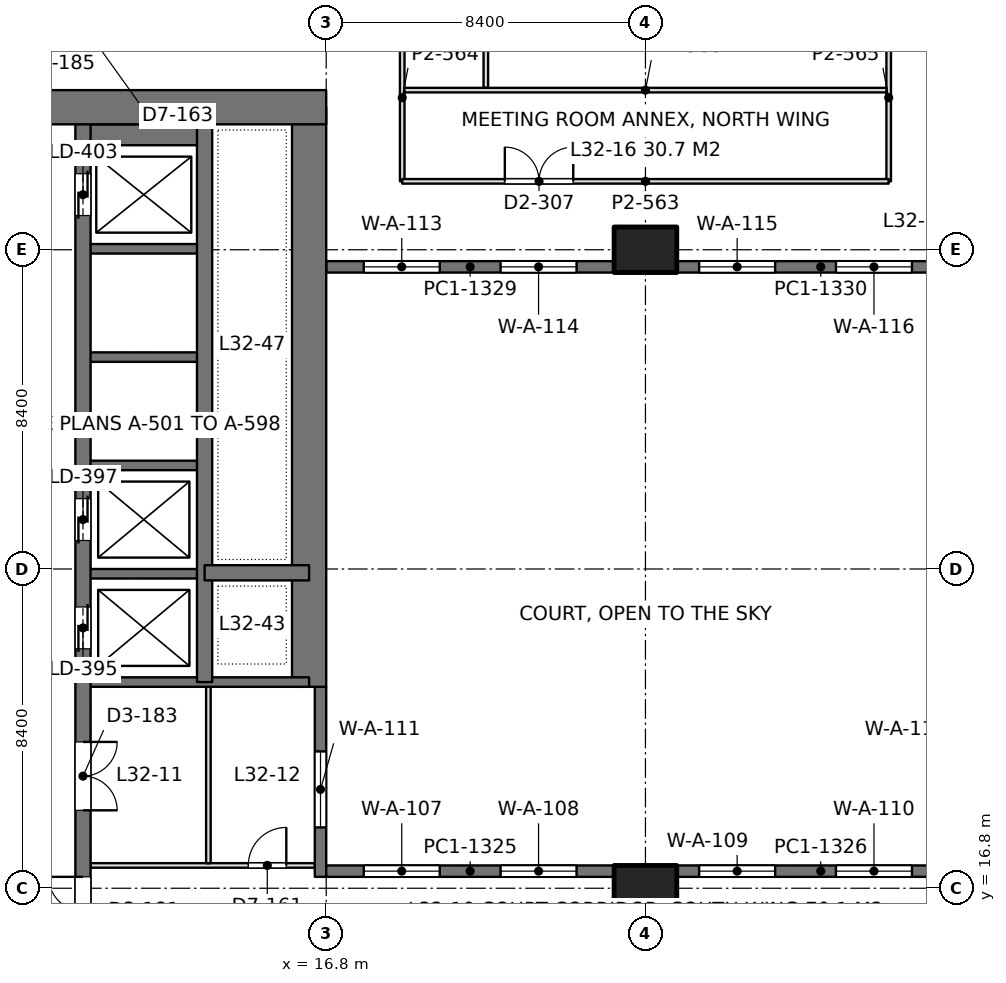
"""IFC4 building model, lengths in metres.
Left out: names, types, materials, properties, quantities, classifications, styles, units other than length and angle.
Written with IfcOpenShell. Run it as: python <this file> out.ifc"""

import sys

from ifc_helpers import new_model, si_unit, direction, frame, frame_2d, origin, origin_2d, place, context, subcontext, project, spatial, rectangle, extrude, element, fill, save


model = new_model("IFC4")
c1 = context("Model", 3, precision=1e-05, world=origin(), true_north=direction((0.0, 1.0)))
c2 = subcontext(c1, "Body", "Model", "MODEL_VIEW")
j1 = project(units=[si_unit("LENGTHUNIT", "METRE"), si_unit("PLANEANGLEUNIT", "RADIAN")], contexts=[c1])
p1 = place(None, origin())
s1 = spatial("IfcSite", under=j1, at=p1, CompositionType="ELEMENT")
p2 = place(p1, origin())
s2 = spatial("IfcBuilding", under=s1, at=p2, CompositionType="ELEMENT")
p3 = place(p2, frame((0.0, 0.0, 142.8)))
s3 = spatial("IfcBuildingStorey", under=s2, at=p3, CompositionType="ELEMENT", Elevation=142.8)
for number, where, z_axis, x_axis in (
    (1, (25.2, 16.8, 0.0), (0.0, 0.0, 1.0), (1.0, 0.0, 0.0)),
    (2, (25.2, 33.6, 0.0), (0.0, 0.0, 1.0), (1.0, 0.0, 0.0)),
):
    element("IfcColumn", number, at=place(p3, frame(where, z_axis=z_axis, x_axis=x_axis)), inside=s3, PredefinedType="COLUMN", context=c2, shape_type="SweptSolid", body=[
        extrude(rectangle(XDim=1.65, YDim=1.2, at=origin_2d()), origin(), (0.0, 0.0, 1.0), 4.2),
    ])
p4 = place(p3, frame((-1.2, 37.35, 0.0), z_axis=(0.0, 0.0, 1.0), x_axis=(1.0, 0.0, 0.0)))
e3 = element("IfcWall", 3, at=p4, inside=s3, PredefinedType="SHEAR", context=c2, shape_type="SweptSolid", body=[
    extrude(rectangle(XDim=18.0, YDim=0.9, at=frame_2d((9.0, 0.0))), origin(), (0.0, 0.0, 1.0), 4.2),
])
p5 = place(p4, frame((8.95, 0.0, 0.0)))
e4 = element("IfcOpeningElement", 4, at=p5, cuts=e3, PredefinedType="OPENING", context=c2, shape_type="SweptSolid", body=[
    extrude(rectangle(XDim=1.8, YDim=2.4, at=frame_2d((0.9, 1.2))), frame((0.0, 0.46, 0.0), z_axis=(0.0, -1.0, 0.0), x_axis=(1.0, 0.0, 0.0)), (0.0, 0.0, 1.0), 0.92),
])
p6 = place(p3, frame((16.35, 22.1, 0.0), z_axis=(0.0, 0.0, 1.0), x_axis=(0.0, 1.0, 0.0)))
e5 = element("IfcWall", 5, at=p6, inside=s3, PredefinedType="SHEAR", context=c2, shape_type="SweptSolid", body=[
    extrude(rectangle(XDim=15.25, YDim=0.9, at=frame_2d((7.625, 0.0))), origin(), (0.0, 0.0, 1.0), 4.2),
])
p7 = place(p3, frame((10.4, 13.05, 0.0), z_axis=(0.0, 0.0, 1.0), x_axis=(0.0, 1.0, 0.0)))
e6 = element("IfcWall", 6, at=p7, inside=s3, PredefinedType="SHEAR", context=c2, shape_type="SweptSolid", body=[
    extrude(rectangle(XDim=24.3, YDim=0.4, at=frame_2d((12.15, 0.0))), origin(), (0.0, 0.0, 1.0), 4.2),
])
p8 = place(p7, frame((10.05, 0.0, 0.0)))
e7 = element("IfcOpeningElement", 7, at=p8, cuts=e6, PredefinedType="OPENING", context=c2, shape_type="SweptSolid", body=[
    extrude(rectangle(XDim=1.1, YDim=2.2, at=frame_2d((0.55, 1.1))), frame((0.0, 0.21, 0.0), z_axis=(0.0, -1.0, 0.0), x_axis=(1.0, 0.0, 0.0)), (0.0, 0.0, 1.0), 0.42),
])
p9 = place(p7, frame((12.9, 0.0, 0.0)))
e8 = element("IfcOpeningElement", 8, at=p9, cuts=e6, PredefinedType="OPENING", context=c2, shape_type="SweptSolid", body=[
    extrude(rectangle(XDim=1.1, YDim=2.2, at=frame_2d((0.55, 1.1))), frame((0.0, 0.21, 0.0), z_axis=(0.0, -1.0, 0.0), x_axis=(1.0, 0.0, 0.0)), (0.0, 0.0, 1.0), 0.42),
])
p10 = place(p7, frame((21.45, 0.0, 0.0)))
e9 = element("IfcOpeningElement", 9, at=p10, cuts=e6, PredefinedType="OPENING", context=c2, shape_type="SweptSolid", body=[
    extrude(rectangle(XDim=1.1, YDim=2.2, at=frame_2d((0.55, 1.1))), frame((0.0, 0.21, 0.0), z_axis=(0.0, -1.0, 0.0), x_axis=(1.0, 0.0, 0.0)), (0.0, 0.0, 1.0), 0.42),
])
p11 = place(p7, frame((2.25, 0.0, 0.0)))
e10 = element("IfcOpeningElement", 10, at=p11, cuts=e6, PredefinedType="OPENING", context=c2, shape_type="SweptSolid", body=[
    extrude(rectangle(XDim=1.8, YDim=2.4, at=frame_2d((0.9, 1.2))), frame((0.0, 0.21, 0.0), z_axis=(0.0, -1.0, 0.0), x_axis=(1.0, 0.0, 0.0)), (0.0, 0.0, 1.0), 0.42),
])
p12 = place(p7, frame((5.8, 0.0, 0.0)))
e11 = element("IfcOpeningElement", 11, at=p12, cuts=e6, PredefinedType="OPENING", context=c2, shape_type="SweptSolid", body=[
    extrude(rectangle(XDim=1.8, YDim=2.4, at=frame_2d((0.9, 1.2))), frame((0.0, 0.21, 0.0), z_axis=(0.0, -1.0, 0.0), x_axis=(1.0, 0.0, 0.0)), (0.0, 0.0, 1.0), 0.42),
])
p13 = place(p3, frame((13.6, 22.225, 0.0), z_axis=(0.0, 0.0, 1.0), x_axis=(0.0, 1.0, 0.0)))
e12 = element("IfcWall", 12, at=p13, inside=s3, PredefinedType="SHEAR", context=c2, shape_type="SweptSolid", body=[
    extrude(rectangle(XDim=15.125, YDim=0.4, at=frame_2d((7.562, 0.0))), origin(), (0.0, 0.0, 1.0), 4.2),
])
p14 = place(p3, frame((13.6, 25.1, 0.0), z_axis=(0.0, 0.0, 1.0), x_axis=(1.0, 0.0, 0.0)))
e13 = element("IfcWall", 13, at=p14, inside=s3, PredefinedType="SHEAR", context=c2, shape_type="SweptSolid", body=[
    extrude(rectangle(XDim=2.75, YDim=0.4, at=frame_2d((1.375, 0.0))), origin(), (0.0, 0.0, 1.0), 4.2),
])
p15 = place(p3, frame((10.4, 22.225, 0.0), z_axis=(0.0, 0.0, 1.0), x_axis=(1.0, 0.0, 0.0)))
e14 = element("IfcWall", 14, at=p15, inside=s3, PredefinedType="SHEAR", context=c2, shape_type="SweptSolid", body=[
    extrude(rectangle(XDim=5.95, YDim=0.25, at=frame_2d((2.975, 0.0))), origin(), (0.0, 0.0, 1.0), 4.2),
])
for number, where, z_axis, x_axis in (
    (15, (10.4, 25.075, 0.0), (0.0, 0.0, 1.0), (1.0, 0.0, 0.0)),
    (16, (10.4, 27.925, 0.0), (0.0, 0.0, 1.0), (1.0, 0.0, 0.0)),
    (17, (10.4, 30.775, 0.0), (0.0, 0.0, 1.0), (1.0, 0.0, 0.0)),
    (18, (10.4, 33.625, 0.0), (0.0, 0.0, 1.0), (1.0, 0.0, 0.0)),
):
    element("IfcWall", number, at=place(p3, frame(where, z_axis=z_axis, x_axis=x_axis)), inside=s3, PredefinedType="SHEAR", context=c2, shape_type="SweptSolid", body=[
        extrude(rectangle(XDim=3.2, YDim=0.25, at=frame_2d((1.6, 0.0))), origin(), (0.0, 0.0, 1.0), 4.2),
    ])
p16 = place(p3, frame((10.4, 36.625, 0.0), z_axis=(0.0, 0.0, 1.0), x_axis=(1.0, 0.0, 0.0)))
e19 = element("IfcWall", 19, at=p16, inside=s3, PredefinedType="SHEAR", context=c2, shape_type="SweptSolid", body=[
    extrude(rectangle(XDim=3.2, YDim=0.55, at=frame_2d((1.6, 0.0))), origin(), (0.0, 0.0, 1.0), 4.2),
])
p17 = place(p3, frame((16.65, 17.1, 0.0), z_axis=(0.0, 0.0, 1.0), x_axis=(0.0, 1.0, 0.0)))
e20 = element("IfcWall", 20, at=p17, inside=s3, PredefinedType="SOLIDWALL", context=c2, shape_type="SweptSolid", body=[
    extrude(rectangle(XDim=5.0, YDim=0.3, at=frame_2d((2.5, 0.0))), origin(), (0.0, 0.0, 1.0), 4.05),
])
p18 = place(p17, frame((1.3, 0.0, 0.1)))
e21 = element("IfcOpeningElement", 21, at=p18, cuts=e20, PredefinedType="OPENING", context=c2, shape_type="SweptSolid", body=[
    extrude(rectangle(XDim=2.0, YDim=3.0, at=frame_2d((1.0, 1.5))), frame((0.0, 0.16, 0.0), z_axis=(0.0, -1.0, 0.0), x_axis=(1.0, 0.0, 0.0)), (0.0, 0.0, 1.0), 0.32),
])
p19 = place(p3, frame((16.8, 17.25, 0.0), z_axis=(0.0, 0.0, 1.0), x_axis=(1.0, 0.0, 0.0)))
e22 = element("IfcWall", 22, at=p19, inside=s3, PredefinedType="SOLIDWALL", context=c2, shape_type="SweptSolid", body=[
    extrude(rectangle(XDim=7.575, YDim=0.3, at=frame_2d((3.788, 0.0))), origin(), (0.0, 0.0, 1.0), 4.05),
])
p20 = place(p19, frame((0.988, 0.0, 0.1)))
e23 = element("IfcOpeningElement", 23, at=p20, cuts=e22, PredefinedType="OPENING", context=c2, shape_type="SweptSolid", body=[
    extrude(rectangle(XDim=2.0, YDim=3.0, at=frame_2d((1.0, 1.5))), frame((0.0, 0.16, 0.0), z_axis=(0.0, -1.0, 0.0), x_axis=(1.0, 0.0, 0.0)), (0.0, 0.0, 1.0), 0.32),
])
p21 = place(p19, frame((4.587, 0.0, 0.1)))
e24 = element("IfcOpeningElement", 24, at=p21, cuts=e22, PredefinedType="OPENING", context=c2, shape_type="SweptSolid", body=[
    extrude(rectangle(XDim=2.0, YDim=3.0, at=frame_2d((1.0, 1.5))), frame((0.0, 0.16, 0.0), z_axis=(0.0, -1.0, 0.0), x_axis=(1.0, 0.0, 0.0)), (0.0, 0.0, 1.0), 0.32),
])
p22 = place(p3, frame((26.025, 17.25, 0.0), z_axis=(0.0, 0.0, 1.0), x_axis=(1.0, 0.0, 0.0)))
e25 = element("IfcWall", 25, at=p22, inside=s3, PredefinedType="SOLIDWALL", context=c2, shape_type="SweptSolid", body=[
    extrude(rectangle(XDim=7.575, YDim=0.3, at=frame_2d((3.788, 0.0))), origin(), (0.0, 0.0, 1.0), 4.05),
])
p23 = place(p22, frame((0.587, 0.0, 0.1)))
e26 = element("IfcOpeningElement", 26, at=p23, cuts=e25, PredefinedType="OPENING", context=c2, shape_type="SweptSolid", body=[
    extrude(rectangle(XDim=2.0, YDim=3.0, at=frame_2d((1.0, 1.5))), frame((0.0, 0.16, 0.0), z_axis=(0.0, -1.0, 0.0), x_axis=(1.0, 0.0, 0.0)), (0.0, 0.0, 1.0), 0.32),
])
p24 = place(p22, frame((4.188, 0.0, 0.1)))
e27 = element("IfcOpeningElement", 27, at=p24, cuts=e25, PredefinedType="OPENING", context=c2, shape_type="SweptSolid", body=[
    extrude(rectangle(XDim=2.0, YDim=3.0, at=frame_2d((1.0, 1.5))), frame((0.0, 0.16, 0.0), z_axis=(0.0, -1.0, 0.0), x_axis=(1.0, 0.0, 0.0)), (0.0, 0.0, 1.0), 0.32),
])
p25 = place(p3, frame((16.8, 33.15, 0.0), z_axis=(0.0, 0.0, 1.0), x_axis=(1.0, 0.0, 0.0)))
e28 = element("IfcWall", 28, at=p25, inside=s3, PredefinedType="SOLIDWALL", context=c2, shape_type="SweptSolid", body=[
    extrude(rectangle(XDim=7.575, YDim=0.3, at=frame_2d((3.788, 0.0))), origin(), (0.0, 0.0, 1.0), 4.05),
])
p26 = place(p25, frame((0.988, 0.0, 0.1)))
e29 = element("IfcOpeningElement", 29, at=p26, cuts=e28, PredefinedType="OPENING", context=c2, shape_type="SweptSolid", body=[
    extrude(rectangle(XDim=2.0, YDim=3.0, at=frame_2d((1.0, 1.5))), frame((0.0, 0.16, 0.0), z_axis=(0.0, -1.0, 0.0), x_axis=(1.0, 0.0, 0.0)), (0.0, 0.0, 1.0), 0.32),
])
p27 = place(p25, frame((4.587, 0.0, 0.1)))
e30 = element("IfcOpeningElement", 30, at=p27, cuts=e28, PredefinedType="OPENING", context=c2, shape_type="SweptSolid", body=[
    extrude(rectangle(XDim=2.0, YDim=3.0, at=frame_2d((1.0, 1.5))), frame((0.0, 0.16, 0.0), z_axis=(0.0, -1.0, 0.0), x_axis=(1.0, 0.0, 0.0)), (0.0, 0.0, 1.0), 0.32),
])
p28 = place(p3, frame((26.025, 33.15, 0.0), z_axis=(0.0, 0.0, 1.0), x_axis=(1.0, 0.0, 0.0)))
e31 = element("IfcWall", 31, at=p28, inside=s3, PredefinedType="SOLIDWALL", context=c2, shape_type="SweptSolid", body=[
    extrude(rectangle(XDim=7.575, YDim=0.3, at=frame_2d((3.788, 0.0))), origin(), (0.0, 0.0, 1.0), 4.05),
])
p29 = place(p28, frame((0.587, 0.0, 0.1)))
e32 = element("IfcOpeningElement", 32, at=p29, cuts=e31, PredefinedType="OPENING", context=c2, shape_type="SweptSolid", body=[
    extrude(rectangle(XDim=2.0, YDim=3.0, at=frame_2d((1.0, 1.5))), frame((0.0, 0.16, 0.0), z_axis=(0.0, -1.0, 0.0), x_axis=(1.0, 0.0, 0.0)), (0.0, 0.0, 1.0), 0.32),
])
p30 = place(p28, frame((4.188, 0.0, 0.1)))
e33 = element("IfcOpeningElement", 33, at=p30, cuts=e31, PredefinedType="OPENING", context=c2, shape_type="SweptSolid", body=[
    extrude(rectangle(XDim=2.0, YDim=3.0, at=frame_2d((1.0, 1.5))), frame((0.0, 0.16, 0.0), z_axis=(0.0, -1.0, 0.0), x_axis=(1.0, 0.0, 0.0)), (0.0, 0.0, 1.0), 0.32),
])
p31 = place(p3, frame((10.598, 17.4, 0.0), z_axis=(0.0, 0.0, 1.0), x_axis=(1.0, 0.0, 0.0)))
e34 = element("IfcWall", 34, at=p31, inside=s3, PredefinedType="PARTITIONING", context=c2, shape_type="SweptSolid", body=[
    extrude(rectangle(XDim=5.904, YDim=0.12, at=frame_2d((2.952, 0.0))), origin(), (0.0, 0.0, 1.0), 3.55),
])
p32 = place(p31, frame((4.152, 0.0, 0.0)))
e35 = element("IfcOpeningElement", 35, at=p32, cuts=e34, PredefinedType="OPENING", context=c2, shape_type="SweptSolid", body=[
    extrude(rectangle(XDim=1.0, YDim=2.4, at=frame_2d((0.5, 1.2))), frame((0.0, 0.07, 0.0), z_axis=(0.0, -1.0, 0.0), x_axis=(1.0, 0.0, 0.0)), (0.0, 0.0, 1.0), 0.14),
])
p33 = place(p3, frame((13.7, 17.458, 0.0), z_axis=(0.0, 0.0, 1.0), x_axis=(0.0, 1.0, 0.0)))
e36 = element("IfcWall", 36, at=p33, inside=s3, PredefinedType="PARTITIONING", context=c2, shape_type="SweptSolid", body=[
    extrude(rectangle(XDim=4.644, YDim=0.12, at=frame_2d((2.322, 0.0))), origin(), (0.0, 0.0, 1.0), 3.6),
])
p34 = place(p3, frame((21.0, 37.858, 0.0), z_axis=(0.0, 0.0, 1.0), x_axis=(0.0, 1.0, 0.0)))
e37 = element("IfcWall", 37, at=p34, inside=s3, PredefinedType="PARTITIONING", context=c2, shape_type="SweptSolid", body=[
    extrude(rectangle(XDim=5.584, YDim=0.12, at=frame_2d((2.792, 0.0))), origin(), (0.0, 0.0, 1.0), 3.55),
])
for number, where, z_axis, x_axis in (
    (38, (18.8, 35.4, 0.0), (0.0, 0.0, 1.0), (0.0, 1.0, 0.0)),
    (39, (31.6, 35.4, 0.0), (0.0, 0.0, 1.0), (0.0, 1.0, 0.0)),
):
    element("IfcWall", number, at=place(p3, frame(where, z_axis=z_axis, x_axis=x_axis)), inside=s3, PredefinedType="PARTITIONING", context=c2, shape_type="SweptSolid", body=[
        extrude(rectangle(XDim=4.4, YDim=0.12, at=frame_2d((2.2, 0.0))), origin(), (0.0, 0.0, 1.0), 4.05),
    ])
p35 = place(p3, frame((18.8, 35.4, 0.0), z_axis=(0.0, 0.0, 1.0), x_axis=(1.0, 0.0, 0.0)))
e40 = element("IfcWall", 40, at=p35, inside=s3, PredefinedType="PARTITIONING", context=c2, shape_type="SweptSolid", body=[
    extrude(rectangle(XDim=12.8, YDim=0.12, at=frame_2d((6.4, 0.0))), origin(), (0.0, 0.0, 1.0), 3.55),
])
p36 = place(p35, frame((2.7, 0.0, 0.0)))
e41 = element("IfcOpeningElement", 41, at=p36, cuts=e40, PredefinedType="OPENING", context=c2, shape_type="SweptSolid", body=[
    extrude(rectangle(XDim=1.8, YDim=2.2, at=frame_2d((0.9, 1.1))), frame((0.0, 0.07, 0.0), z_axis=(0.0, -1.0, 0.0), x_axis=(1.0, 0.0, 0.0)), (0.0, 0.0, 1.0), 0.14),
])
p37 = place(p3, frame((18.858, 37.8, 0.0), z_axis=(0.0, 0.0, 1.0), x_axis=(1.0, 0.0, 0.0)))
e42 = element("IfcWall", 42, at=p37, inside=s3, PredefinedType="PARTITIONING", context=c2, shape_type="SweptSolid", body=[
    extrude(rectangle(XDim=12.684, YDim=0.12, at=frame_2d((6.342, 0.0))), origin(), (0.0, 0.0, 1.0), 3.55),
])
p38 = place(p18, origin())
e43 = element("IfcWindow", 43, at=p38, inside=s3, PartitioningType="SINGLE_PANEL", PredefinedType="WINDOW", context=c2, shape_type="SweptSolid", body=[
    extrude(rectangle(XDim=2.0, YDim=3.0, at=frame_2d((1.0, 1.5))), frame((0.0, 0.03, 0.0), z_axis=(0.0, -1.0, 0.0), x_axis=(1.0, 0.0, 0.0)), (0.0, 0.0, 1.0), 0.06),
])
fill(e21, e43)
p39 = place(p20, origin())
e44 = element("IfcWindow", 44, at=p39, inside=s3, PartitioningType="SINGLE_PANEL", PredefinedType="WINDOW", context=c2, shape_type="SweptSolid", body=[
    extrude(rectangle(XDim=2.0, YDim=3.0, at=frame_2d((1.0, 1.5))), frame((0.0, 0.03, 0.0), z_axis=(0.0, -1.0, 0.0), x_axis=(1.0, 0.0, 0.0)), (0.0, 0.0, 1.0), 0.06),
])
fill(e23, e44)
p40 = place(p21, origin())
e45 = element("IfcWindow", 45, at=p40, inside=s3, PartitioningType="SINGLE_PANEL", PredefinedType="WINDOW", context=c2, shape_type="SweptSolid", body=[
    extrude(rectangle(XDim=2.0, YDim=3.0, at=frame_2d((1.0, 1.5))), frame((0.0, 0.03, 0.0), z_axis=(0.0, -1.0, 0.0), x_axis=(1.0, 0.0, 0.0)), (0.0, 0.0, 1.0), 0.06),
])
fill(e24, e45)
p41 = place(p23, origin())
e46 = element("IfcWindow", 46, at=p41, inside=s3, PartitioningType="SINGLE_PANEL", PredefinedType="WINDOW", context=c2, shape_type="SweptSolid", body=[
    extrude(rectangle(XDim=2.0, YDim=3.0, at=frame_2d((1.0, 1.5))), frame((0.0, 0.03, 0.0), z_axis=(0.0, -1.0, 0.0), x_axis=(1.0, 0.0, 0.0)), (0.0, 0.0, 1.0), 0.06),
])
fill(e26, e46)
p42 = place(p24, origin())
e47 = element("IfcWindow", 47, at=p42, inside=s3, PartitioningType="SINGLE_PANEL", PredefinedType="WINDOW", context=c2, shape_type="SweptSolid", body=[
    extrude(rectangle(XDim=2.0, YDim=3.0, at=frame_2d((1.0, 1.5))), frame((0.0, 0.03, 0.0), z_axis=(0.0, -1.0, 0.0), x_axis=(1.0, 0.0, 0.0)), (0.0, 0.0, 1.0), 0.06),
])
fill(e27, e47)
p43 = place(p26, origin())
e48 = element("IfcWindow", 48, at=p43, inside=s3, PartitioningType="SINGLE_PANEL", PredefinedType="WINDOW", context=c2, shape_type="SweptSolid", body=[
    extrude(rectangle(XDim=2.0, YDim=3.0, at=frame_2d((1.0, 1.5))), frame((0.0, 0.03, 0.0), z_axis=(0.0, -1.0, 0.0), x_axis=(1.0, 0.0, 0.0)), (0.0, 0.0, 1.0), 0.06),
])
fill(e29, e48)
p44 = place(p27, origin())
e49 = element("IfcWindow", 49, at=p44, inside=s3, PartitioningType="SINGLE_PANEL", PredefinedType="WINDOW", context=c2, shape_type="SweptSolid", body=[
    extrude(rectangle(XDim=2.0, YDim=3.0, at=frame_2d((1.0, 1.5))), frame((0.0, 0.03, 0.0), z_axis=(0.0, -1.0, 0.0), x_axis=(1.0, 0.0, 0.0)), (0.0, 0.0, 1.0), 0.06),
])
fill(e30, e49)
p45 = place(p29, origin())
e50 = element("IfcWindow", 50, at=p45, inside=s3, PartitioningType="SINGLE_PANEL", PredefinedType="WINDOW", context=c2, shape_type="SweptSolid", body=[
    extrude(rectangle(XDim=2.0, YDim=3.0, at=frame_2d((1.0, 1.5))), frame((0.0, 0.03, 0.0), z_axis=(0.0, -1.0, 0.0), x_axis=(1.0, 0.0, 0.0)), (0.0, 0.0, 1.0), 0.06),
])
fill(e32, e50)
p46 = place(p30, origin())
e51 = element("IfcWindow", 51, at=p46, inside=s3, PartitioningType="SINGLE_PANEL", PredefinedType="WINDOW", context=c2, shape_type="SweptSolid", body=[
    extrude(rectangle(XDim=2.0, YDim=3.0, at=frame_2d((1.0, 1.5))), frame((0.0, 0.03, 0.0), z_axis=(0.0, -1.0, 0.0), x_axis=(1.0, 0.0, 0.0)), (0.0, 0.0, 1.0), 0.06),
])
fill(e33, e51)
p47 = place(p8, origin())
e52 = element("IfcDoor", 52, at=p47, inside=s3, OperationType="DOUBLE_DOOR_SLIDING", PredefinedType="DOOR", context=c2, shape_type="SweptSolid", body=[
    extrude(rectangle(XDim=1.1, YDim=2.2, at=frame_2d((0.55, 1.1))), frame((0.0, 0.025, 0.0), z_axis=(0.0, -1.0, 0.0), x_axis=(1.0, 0.0, 0.0)), (0.0, 0.0, 1.0), 0.05),
])
fill(e7, e52)
p48 = place(p9, origin())
e53 = element("IfcDoor", 53, at=p48, inside=s3, OperationType="DOUBLE_DOOR_SLIDING", PredefinedType="DOOR", context=c2, shape_type="SweptSolid", body=[
    extrude(rectangle(XDim=1.1, YDim=2.2, at=frame_2d((0.55, 1.1))), frame((0.0, 0.025, 0.0), z_axis=(0.0, -1.0, 0.0), x_axis=(1.0, 0.0, 0.0)), (0.0, 0.0, 1.0), 0.05),
])
fill(e8, e53)
p49 = place(p10, origin())
e54 = element("IfcDoor", 54, at=p49, inside=s3, OperationType="DOUBLE_DOOR_SLIDING", PredefinedType="DOOR", context=c2, shape_type="SweptSolid", body=[
    extrude(rectangle(XDim=1.1, YDim=2.2, at=frame_2d((0.55, 1.1))), frame((0.0, 0.025, 0.0), z_axis=(0.0, -1.0, 0.0), x_axis=(1.0, 0.0, 0.0)), (0.0, 0.0, 1.0), 0.05),
])
fill(e9, e54)
p50 = place(p11, origin())
e55 = element("IfcDoor", 55, at=p50, inside=s3, OperationType="DOUBLE_DOOR_SINGLE_SWING", PredefinedType="DOOR", context=c2, shape_type="SweptSolid", body=[
    extrude(rectangle(XDim=1.8, YDim=2.4, at=frame_2d((0.9, 1.2))), frame((0.0, 0.025, 0.0), z_axis=(0.0, -1.0, 0.0), x_axis=(1.0, 0.0, 0.0)), (0.0, 0.0, 1.0), 0.05),
])
fill(e10, e55)
p51 = place(p12, frame((1.8, 0.0, 0.0), z_axis=(0.0, 0.0, 1.0), x_axis=(-1.0, 0.0, 0.0)))
e56 = element("IfcDoor", 56, at=p51, inside=s3, OperationType="DOUBLE_DOOR_SINGLE_SWING", PredefinedType="DOOR", context=c2, shape_type="SweptSolid", body=[
    extrude(rectangle(XDim=1.8, YDim=2.4, at=frame_2d((0.9, 1.2))), frame((0.0, 0.025, 0.0), z_axis=(0.0, -1.0, 0.0), x_axis=(1.0, 0.0, 0.0)), (0.0, 0.0, 1.0), 0.05),
])
fill(e11, e56)
p52 = place(p32, origin())
e57 = element("IfcDoor", 57, at=p52, inside=s3, OperationType="SINGLE_SWING_RIGHT", PredefinedType="DOOR", context=c2, shape_type="SweptSolid", body=[
    extrude(rectangle(XDim=1.0, YDim=2.4, at=frame_2d((0.5, 1.2))), frame((0.0, 0.025, 0.0), z_axis=(0.0, -1.0, 0.0), x_axis=(1.0, 0.0, 0.0)), (0.0, 0.0, 1.0), 0.05),
])
fill(e35, e57)
p53 = place(p36, origin())
e58 = element("IfcDoor", 58, at=p53, inside=s3, OperationType="DOUBLE_DOOR_SINGLE_SWING", PredefinedType="DOOR", context=c2, shape_type="SweptSolid", body=[
    extrude(rectangle(XDim=1.8, YDim=2.2, at=frame_2d((0.9, 1.1))), frame((0.0, 0.025, 0.0), z_axis=(0.0, -1.0, 0.0), x_axis=(1.0, 0.0, 0.0)), (0.0, 0.0, 1.0), 0.05),
])
fill(e41, e58)
save(model, sys.argv[1])
